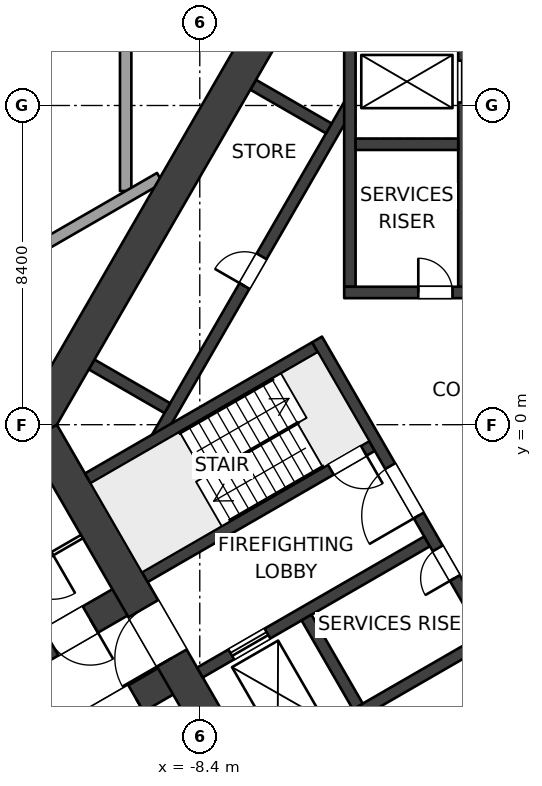
"""IFC4 building model, lengths in metres.
Left out: names, types, materials, properties, quantities, classifications, styles, units other than length and angle.
Written with IfcOpenShell. Run it as: python <this file> out.ifc"""

import sys

from ifc_helpers import new_model, si_unit, direction, frame, frame_2d, origin, place, context, subcontext, project, spatial, polyline, rectangle, outline, extrude, element, fill, save


model = new_model("IFC4")
c1 = context("Model", 3, precision=1e-05, world=origin(), true_north=direction((0.0, 1.0)))
c2 = subcontext(c1, "Body", "Model", "MODEL_VIEW")
j1 = project(units=[si_unit("LENGTHUNIT", "METRE"), si_unit("PLANEANGLEUNIT", "RADIAN")], contexts=[c1])
p1 = place(None, origin())
s1 = spatial("IfcSite", under=j1, at=p1, CompositionType="ELEMENT")
p2 = place(p1, origin())
s2 = spatial("IfcBuilding", under=s1, at=p2, CompositionType="ELEMENT")
p3 = place(p2, frame((0.0, 0.0, -7.0)))
s3 = spatial("IfcBuildingStorey", under=s2, at=p3, CompositionType="ELEMENT", Elevation=-7.0)
p4 = place(p3, frame((-6.47, -10.757, 0.0), z_axis=(0.0, 0.0, 1.0), x_axis=(-0.499997612506, 0.8660267822, 0.0)))
e1 = element("IfcWall", 1, at=p4, inside=s3, PredefinedType="SHEAR", context=c2, shape_type="SweptSolid", body=[
    extrude(rectangle(XDim=12.161, YDim=0.9, at=frame_2d((6.08, 0.0))), origin(), (0.0, 0.0, 1.0), 3.5),
])
p5 = place(p4, frame((5.33, 0.0, 0.0)))
e2 = element("IfcOpeningElement", 2, at=p5, cuts=e1, PredefinedType="OPENING", context=c2, shape_type="SweptSolid", body=[
    extrude(rectangle(XDim=1.5, YDim=2.1, at=frame_2d((0.75, 1.05))), frame((0.0, 0.46, 0.0), z_axis=(0.0, -1.0, 0.0), x_axis=(1.0, 0.0, 0.0)), (0.0, 0.0, 1.0), 0.92),
])
p6 = place(p3, origin())
e3 = element("IfcWall", 3, at=p6, inside=s3, PredefinedType="SHEAR", context=c2, shape_type="SweptSolid", body=[
    extrude(outline(polyline([(-6.6, 11.432), (-13.2, 0.0), (-12.94, -0.45), (-12.161, 0.0), (-6.08, 10.531), (-6.08, 11.432), (-6.6, 11.432)])), origin(), (0.0, 0.0, 1.0), 3.5),
])
p7 = place(p3, frame((-4.6, 3.48, 0.0), z_axis=(0.0, 0.0, 1.0), x_axis=(1.0, 0.0, 0.0)))
e4 = element("IfcWall", 4, at=p7, inside=s3, PredefinedType="SHEAR", context=c2, shape_type="SweptSolid", body=[
    extrude(rectangle(XDim=9.2, YDim=0.3, at=frame_2d((4.6, 0.0))), origin(), (0.0, 0.0, 1.0), 3.5),
])
p8 = place(p7, frame((3.85, 0.0, 0.0)))
e5 = element("IfcOpeningElement", 5, at=p8, cuts=e4, PredefinedType="OPENING", context=c2, shape_type="SweptSolid", body=[
    extrude(rectangle(XDim=1.5, YDim=2.1, at=frame_2d((0.75, 1.05))), frame((0.0, 0.16, 0.0), z_axis=(0.0, -1.0, 0.0), x_axis=(1.0, 0.0, 0.0)), (0.0, 0.0, 1.0), 0.32),
])
p9 = place(p7, frame((1.95, 0.0, 0.0)))
e6 = element("IfcOpeningElement", 6, at=p9, cuts=e4, PredefinedType="OPENING", context=c2, shape_type="SweptSolid", body=[
    extrude(rectangle(XDim=0.9, YDim=2.1, at=frame_2d((0.45, 1.05))), frame((0.0, 0.16, 0.0), z_axis=(0.0, -1.0, 0.0), x_axis=(1.0, 0.0, 0.0)), (0.0, 0.0, 1.0), 0.32),
])
p10 = place(p3, frame((-1.45, 3.63, 0.0), z_axis=(0.0, 0.0, 1.0), x_axis=(0.0, 1.0, 0.0)))
e7 = element("IfcWall", 7, at=p10, inside=s3, PredefinedType="SHEAR", context=c2, shape_type="SweptSolid", body=[
    extrude(rectangle(XDim=6.902, YDim=0.3, at=frame_2d((3.451, 0.0))), origin(), (0.0, 0.0, 1.0), 3.5),
])
p11 = place(p10, frame((4.85, 0.0, 0.0)))
e8 = element("IfcOpeningElement", 8, at=p11, cuts=e7, PredefinedType="OPENING", context=c2, shape_type="SweptSolid", body=[
    extrude(rectangle(XDim=1.1, YDim=2.1, at=frame_2d((0.55, 1.05))), frame((0.0, 0.16, 0.0), z_axis=(0.0, -1.0, 0.0), x_axis=(1.0, 0.0, 0.0)), (0.0, 0.0, 1.0), 0.32),
])
p12 = place(p3, frame((-4.45, 3.63, 0.0), z_axis=(0.0, 0.0, 1.0), x_axis=(0.0, 1.0, 0.0)))
e9 = element("IfcWall", 9, at=p12, inside=s3, PredefinedType="SHEAR", context=c2, shape_type="SweptSolid", body=[
    extrude(rectangle(XDim=6.902, YDim=0.3, at=frame_2d((3.451, 0.0))), origin(), (0.0, 0.0, 1.0), 3.5),
])
p13 = place(p3, frame((-4.3, 7.38, 0.0), z_axis=(0.0, 0.0, 1.0), x_axis=(1.0, 0.0, 0.0)))
e10 = element("IfcWall", 10, at=p13, inside=s3, PredefinedType="SHEAR", context=c2, shape_type="SweptSolid", body=[
    extrude(rectangle(XDim=2.7, YDim=0.3, at=frame_2d((1.35, 0.0))), origin(), (0.0, 0.0, 1.0), 3.5),
])
p14 = place(p3, frame((-0.714, -5.724, 0.0), z_axis=(0.0, 0.0, 1.0), x_axis=(-0.499995050369, 0.866028261437, 0.0)))
e11 = element("IfcWall", 11, at=p14, inside=s3, PredefinedType="SHEAR", context=c2, shape_type="SweptSolid", body=[
    extrude(rectangle(XDim=9.2, YDim=0.3, at=frame_2d((4.6, 0.0))), origin(), (0.0, 0.0, 1.0), 3.5),
])
p15 = place(p14, frame((3.85, 0.0, 0.0)))
e12 = element("IfcOpeningElement", 12, at=p15, cuts=e11, PredefinedType="OPENING", context=c2, shape_type="SweptSolid", body=[
    extrude(rectangle(XDim=1.5, YDim=2.1, at=frame_2d((0.75, 1.05))), frame((0.0, 0.16, 0.0), z_axis=(0.0, -1.0, 0.0), x_axis=(1.0, 0.0, 0.0)), (0.0, 0.0, 1.0), 0.32),
])
p16 = place(p14, frame((1.95, 0.0, 0.0)))
e13 = element("IfcOpeningElement", 13, at=p16, cuts=e11, PredefinedType="OPENING", context=c2, shape_type="SweptSolid", body=[
    extrude(rectangle(XDim=0.9, YDim=2.1, at=frame_2d((0.45, 1.05))), frame((0.0, 0.16, 0.0), z_axis=(0.0, -1.0, 0.0), x_axis=(1.0, 0.0, 0.0)), (0.0, 0.0, 1.0), 0.32),
])
p17 = place(p3, frame((-3.869, -0.559, 0.0), z_axis=(0.0, 0.0, 1.0), x_axis=(-0.86602711848, -0.499997030048, 0.0)))
e14 = element("IfcWall", 14, at=p17, inside=s3, PredefinedType="SHEAR", context=c2, shape_type="SweptSolid", body=[
    extrude(rectangle(XDim=6.901, YDim=0.3, at=frame_2d((3.451, 0.0))), origin(), (0.0, 0.0, 1.0), 3.5),
])
p18 = place(p17, frame((0.25, 0.0, 0.0)))
e15 = element("IfcOpeningElement", 15, at=p18, cuts=e14, PredefinedType="OPENING", context=c2, shape_type="SweptSolid", body=[
    extrude(rectangle(XDim=1.0, YDim=2.1, at=frame_2d((0.5, 1.05))), frame((0.0, 0.16, 0.0), z_axis=(0.0, -1.0, 0.0), x_axis=(1.0, 0.0, 0.0)), (0.0, 0.0, 1.0), 0.32),
])
p19 = place(p3, frame((-5.369, 2.039, 0.0), z_axis=(0.0, 0.0, 1.0), x_axis=(-0.86602711848, -0.499997030048, 0.0)))
e16 = element("IfcWall", 16, at=p19, inside=s3, PredefinedType="SHEAR", context=c2, shape_type="SweptSolid", body=[
    extrude(rectangle(XDim=6.901, YDim=0.3, at=frame_2d((3.451, 0.0))), origin(), (0.0, 0.0, 1.0), 3.5),
])
p20 = place(p3, frame((-2.419, -3.071, 0.0), z_axis=(0.0, 0.0, 1.0), x_axis=(-0.86602711848, -0.499997030048, 0.0)))
e17 = element("IfcWall", 17, at=p20, inside=s3, PredefinedType="SHEAR", context=c2, shape_type="SweptSolid", body=[
    extrude(rectangle(XDim=6.901, YDim=0.3, at=frame_2d((3.451, 0.0))), origin(), (0.0, 0.0, 1.0), 3.5),
])
p21 = place(p20, frame((4.85, 0.0, 0.0)))
e18 = element("IfcOpeningElement", 18, at=p21, cuts=e17, PredefinedType="OPENING", context=c2, shape_type="SweptSolid", body=[
    extrude(rectangle(XDim=1.1, YDim=2.1, at=frame_2d((0.55, 1.05))), frame((0.0, 0.16, 0.0), z_axis=(0.0, -1.0, 0.0), x_axis=(1.0, 0.0, 0.0)), (0.0, 0.0, 1.0), 0.32),
])
p22 = place(p3, frame((-0.919, -5.669, 0.0), z_axis=(0.0, 0.0, 1.0), x_axis=(-0.866011800373, -0.500023561059, 0.0)))
e19 = element("IfcWall", 19, at=p22, inside=s3, PredefinedType="SHEAR", context=c2, shape_type="SweptSolid", body=[
    extrude(rectangle(XDim=6.902, YDim=0.3, at=frame_2d((3.451, 0.0))), origin(), (0.0, 0.0, 1.0), 3.5),
])
p23 = place(p3, frame((-4.241, -7.414, 0.0), z_axis=(0.0, 0.0, 1.0), x_axis=(-0.500048589285, 0.86599734893, 0.0)))
e20 = element("IfcWall", 20, at=p23, inside=s3, PredefinedType="SHEAR", context=c2, shape_type="SweptSolid", body=[
    extrude(rectangle(XDim=2.7, YDim=0.3, at=frame_2d((1.35, 0.0))), origin(), (0.0, 0.0, 1.0), 3.5),
])
p24 = place(p3, frame((-9.548, -0.374, 0.0), z_axis=(0.0, 0.0, 1.0), x_axis=(0.500002290144, 0.866024081565, 0.0)))
e21 = element("IfcWall", 21, at=p24, inside=s3, PredefinedType="SHEAR", context=c2, shape_type="SweptSolid", body=[
    extrude(rectangle(XDim=10.195, YDim=0.3, at=frame_2d((5.098, 0.0))), origin(), (0.0, 0.0, 1.0), 3.5),
])
p25 = place(p24, frame((4.648, 0.0, 0.0)))
e22 = element("IfcOpeningElement", 22, at=p25, cuts=e21, PredefinedType="OPENING", context=c2, shape_type="SweptSolid", body=[
    extrude(rectangle(XDim=0.9, YDim=2.1, at=frame_2d((0.45, 1.05))), frame((0.0, 0.16, 0.0), z_axis=(0.0, -1.0, 0.0), x_axis=(1.0, 0.0, 0.0)), (0.0, 0.0, 1.0), 0.32),
])
for number, where, z_axis, x_axis in (
    (23, (-9.254, 0.435, 0.0), (0.0, 0.0, 1.0), (-0.866, 0.5, 0.0)),
    (24, (-5.004, 7.796, 0.0), (0.0, 0.0, 1.0), (-0.866, 0.5, 0.0)),
):
    element("IfcWall", number, at=place(p3, frame(where, z_axis=z_axis, x_axis=x_axis)), inside=s3, PredefinedType="SHEAR", context=c2, shape_type="SweptSolid", body=[
        extrude(rectangle(XDim=2.3, YDim=0.3, at=frame_2d((1.15, 0.0))), origin(), (0.0, 0.0, 1.0), 3.5),
    ])
p26 = place(p3, frame((-8.91, -6.53, 0.0), z_axis=(0.0, 0.0, 1.0), x_axis=(-0.866025284237, -0.500000207062, 0.0)))
e25 = element("IfcWall", 25, at=p26, inside=s3, PredefinedType="SHEAR", context=c2, shape_type="SweptSolid", body=[
    extrude(rectangle(XDim=36.75, YDim=0.8, at=frame_2d((18.375, 0.0))), origin(), (0.0, 0.0, 1.0), 3.5),
])
p27 = place(p26, frame((1.35, 0.0, 0.0)))
e26 = element("IfcOpeningElement", 26, at=p27, cuts=e25, PredefinedType="OPENING", context=c2, shape_type="SweptSolid", body=[
    extrude(rectangle(XDim=1.2, YDim=2.1, at=frame_2d((0.6, 1.05))), frame((0.0, 0.41, 0.0), z_axis=(0.0, -1.0, 0.0), x_axis=(1.0, 0.0, 0.0)), (0.0, 0.0, 1.0), 0.82),
])
p28 = place(p3, frame((-10.11, -4.451, 0.0), z_axis=(0.0, 0.0, 1.0), x_axis=(-0.866025284237, -0.500000207062, 0.0)))
e27 = element("IfcWall", 27, at=p28, inside=s3, PredefinedType="SHEAR", context=c2, shape_type="SweptSolid", body=[
    extrude(rectangle(XDim=36.75, YDim=0.8, at=frame_2d((18.375, 0.0))), origin(), (0.0, 0.0, 1.0), 3.5),
])
p29 = place(p28, frame((1.35, 0.0, 0.0)))
e28 = element("IfcOpeningElement", 28, at=p29, cuts=e27, PredefinedType="OPENING", context=c2, shape_type="SweptSolid", body=[
    extrude(rectangle(XDim=1.2, YDim=2.1, at=frame_2d((0.6, 1.05))), frame((0.0, 0.41, 0.0), z_axis=(0.0, -1.0, 0.0), x_axis=(1.0, 0.0, 0.0)), (0.0, 0.0, 1.0), 0.82),
])
p30 = place(p3, frame((-11.5, -2.945, 0.0), z_axis=(0.0, 0.0, 1.0), x_axis=(-0.866034573852, -0.49998411664, 0.0)))
e29 = element("IfcWall", 29, at=p30, inside=s3, PredefinedType="PARTITIONING", context=c2, shape_type="SweptSolid", body=[
    extrude(rectangle(XDim=2.8, YDim=0.1, at=frame_2d((1.4, 0.0))), origin(), (0.0, 0.0, 1.0), 3.2),
])
p31 = place(p30, frame((0.9, 0.0, 0.0)))
e30 = element("IfcOpeningElement", 30, at=p31, cuts=e29, PredefinedType="OPENING", context=c2, shape_type="SweptSolid", body=[
    extrude(rectangle(XDim=1.2, YDim=2.1, at=frame_2d((0.6, 1.05))), frame((0.0, 0.06, 0.0), z_axis=(0.0, -1.0, 0.0), x_axis=(1.0, 0.0, 0.0)), (0.0, 0.0, 1.0), 0.12),
])
p32 = place(p3, frame((-10.35, 6.149, 0.0), z_axis=(0.0, 0.0, 1.0), x_axis=(0.0, 1.0, 0.0)))
e31 = element("IfcWall", 31, at=p32, inside=s3, PredefinedType="SOLIDWALL", context=c2, shape_type="SweptSolid", body=[
    extrude(rectangle(XDim=41.883, YDim=0.3, at=frame_2d((20.941, 0.0))), origin(), (0.0, 0.0, 1.0), 3.2),
])
p33 = place(p32, frame((25.383, 0.0, 0.0)))
e32 = element("IfcOpeningElement", 32, at=p33, cuts=e31, PredefinedType="OPENING", context=c2, shape_type="SweptSolid", body=[
    extrude(rectangle(XDim=1.8, YDim=2.4, at=frame_2d((0.9, 1.2))), frame((0.0, 0.16, 0.0), z_axis=(0.0, -1.0, 0.0), x_axis=(1.0, 0.0, 0.0)), (0.0, 0.0, 1.0), 0.32),
])
p34 = place(p3, frame((-9.45, 6.495, 0.0), z_axis=(0.0, 0.0, 1.0), x_axis=(-0.866025301493, -0.500000177174, 0.0)))
e33 = element("IfcWall", 33, at=p34, inside=s3, PredefinedType="SOLIDWALL", context=c2, shape_type="SweptSolid", body=[
    extrude(rectangle(XDim=43.095, YDim=0.3, at=frame_2d((21.548, 0.0))), origin(), (0.0, 0.0, 1.0), 3.2),
])
p35 = place(p34, frame((26.595, 0.0, 0.0)))
e34 = element("IfcOpeningElement", 34, at=p35, cuts=e33, PredefinedType="OPENING", context=c2, shape_type="SweptSolid", body=[
    extrude(rectangle(XDim=1.8, YDim=2.4, at=frame_2d((0.9, 1.2))), frame((0.0, 0.16, 0.0), z_axis=(0.0, -1.0, 0.0), x_axis=(1.0, 0.0, 0.0)), (0.0, 0.0, 1.0), 0.32),
])
p36 = place(p21, origin())
e35 = element("IfcDoor", 35, at=p36, inside=s3, OperationType="DOUBLE_DOOR_SLIDING", PredefinedType="DOOR", context=c2, shape_type="SweptSolid", body=[
    extrude(rectangle(XDim=1.1, YDim=2.1, at=frame_2d((0.55, 1.05))), frame((0.0, 0.025, 0.0), z_axis=(0.0, -1.0, 0.0), x_axis=(1.0, 0.0, 0.0)), (0.0, 0.0, 1.0), 0.05),
])
fill(e18, e35)
p37 = place(p9, origin())
e36 = element("IfcDoor", 36, at=p37, inside=s3, OperationType="SINGLE_SWING_LEFT", PredefinedType="DOOR", context=c2, shape_type="SweptSolid", body=[
    extrude(rectangle(XDim=0.9, YDim=2.1, at=frame_2d((0.45, 1.05))), frame((0.0, 0.025, 0.0), z_axis=(0.0, -1.0, 0.0), x_axis=(1.0, 0.0, 0.0)), (0.0, 0.0, 1.0), 0.05),
])
fill(e6, e36)
p38 = place(p15, origin())
e37 = element("IfcDoor", 37, at=p38, inside=s3, OperationType="DOUBLE_DOOR_DOUBLE_SWING", PredefinedType="DOOR", context=c2, shape_type="SweptSolid", body=[
    extrude(rectangle(XDim=1.5, YDim=2.1, at=frame_2d((0.75, 1.05))), frame((0.0, 0.025, 0.0), z_axis=(0.0, -1.0, 0.0), x_axis=(1.0, 0.0, 0.0)), (0.0, 0.0, 1.0), 0.05),
])
fill(e12, e37)
p39 = place(p16, origin())
e38 = element("IfcDoor", 38, at=p39, inside=s3, OperationType="SINGLE_SWING_LEFT", PredefinedType="DOOR", context=c2, shape_type="SweptSolid", body=[
    extrude(rectangle(XDim=0.9, YDim=2.1, at=frame_2d((0.45, 1.05))), frame((0.0, 0.025, 0.0), z_axis=(0.0, -1.0, 0.0), x_axis=(1.0, 0.0, 0.0)), (0.0, 0.0, 1.0), 0.05),
])
fill(e13, e38)
p40 = place(p18, origin())
e39 = element("IfcDoor", 39, at=p40, inside=s3, OperationType="SINGLE_SWING_LEFT", PredefinedType="DOOR", context=c2, shape_type="SweptSolid", body=[
    extrude(rectangle(XDim=1.0, YDim=2.1, at=frame_2d((0.5, 1.05))), frame((0.0, 0.025, 0.0), z_axis=(0.0, -1.0, 0.0), x_axis=(1.0, 0.0, 0.0)), (0.0, 0.0, 1.0), 0.05),
])
fill(e15, e39)
p41 = place(p5, origin())
e40 = element("IfcDoor", 40, at=p41, inside=s3, OperationType="DOUBLE_DOOR_DOUBLE_SWING", PredefinedType="DOOR", context=c2, shape_type="SweptSolid", body=[
    extrude(rectangle(XDim=1.5, YDim=2.1, at=frame_2d((0.75, 1.05))), frame((0.0, 0.025, 0.0), z_axis=(0.0, -1.0, 0.0), x_axis=(1.0, 0.0, 0.0)), (0.0, 0.0, 1.0), 0.05),
])
fill(e2, e40)
p42 = place(p25, origin())
e41 = element("IfcDoor", 41, at=p42, inside=s3, OperationType="SINGLE_SWING_LEFT", PredefinedType="DOOR", context=c2, shape_type="SweptSolid", body=[
    extrude(rectangle(XDim=0.9, YDim=2.1, at=frame_2d((0.45, 1.05))), frame((0.0, 0.025, 0.0), z_axis=(0.0, -1.0, 0.0), x_axis=(1.0, 0.0, 0.0)), (0.0, 0.0, 1.0), 0.05),
])
fill(e22, e41)
p43 = place(p27, origin())
e42 = element("IfcDoor", 42, at=p43, inside=s3, OperationType="DOUBLE_SWING_LEFT", PredefinedType="DOOR", context=c2, shape_type="SweptSolid", body=[
    extrude(rectangle(XDim=1.2, YDim=2.1, at=frame_2d((0.6, 1.05))), frame((0.0, 0.025, 0.0), z_axis=(0.0, -1.0, 0.0), x_axis=(1.0, 0.0, 0.0)), (0.0, 0.0, 1.0), 0.05),
])
fill(e26, e42)
p44 = place(p29, origin())
e43 = element("IfcDoor", 43, at=p44, inside=s3, OperationType="DOUBLE_SWING_LEFT", PredefinedType="DOOR", context=c2, shape_type="SweptSolid", body=[
    extrude(rectangle(XDim=1.2, YDim=2.1, at=frame_2d((0.6, 1.05))), frame((0.0, 0.025, 0.0), z_axis=(0.0, -1.0, 0.0), x_axis=(1.0, 0.0, 0.0)), (0.0, 0.0, 1.0), 0.05),
])
fill(e28, e43)
p45 = place(p31, origin())
e44 = element("IfcDoor", 44, at=p45, inside=s3, OperationType="DOUBLE_SWING_LEFT", PredefinedType="DOOR", context=c2, shape_type="SweptSolid", body=[
    extrude(rectangle(XDim=1.2, YDim=2.1, at=frame_2d((0.6, 1.05))), frame((0.0, 0.025, 0.0), z_axis=(0.0, -1.0, 0.0), x_axis=(1.0, 0.0, 0.0)), (0.0, 0.0, 1.0), 0.05),
])
fill(e30, e44)
save(model, sys.argv[1])
